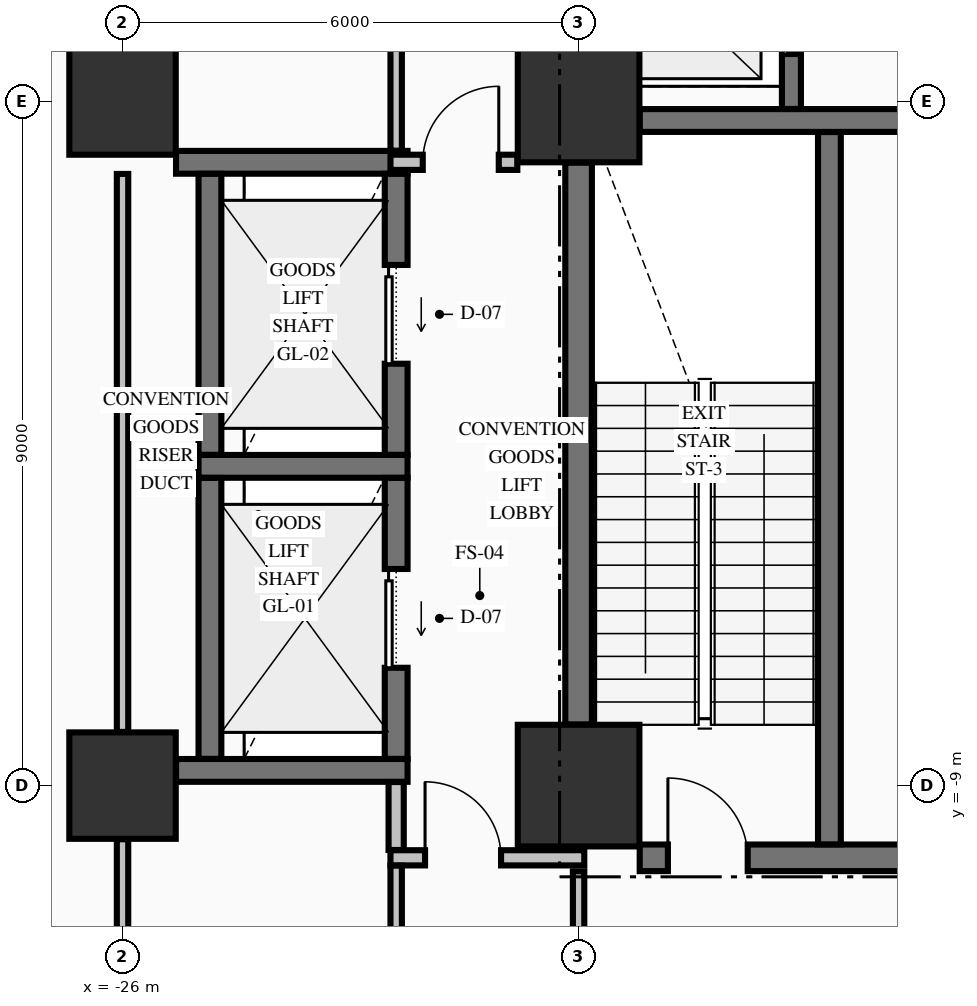
"""IFC4 building model, lengths in metres.
Left out: names, types, materials, properties, quantities, classifications, styles, units other than length and angle.
Written with IfcOpenShell. Run it as: python <this file> out.ifc"""

import sys

from ifc_helpers import new_model, si_unit, direction, frame, frame_2d, origin, origin_2d, place, context, subcontext, project, spatial, rectangle, extrude, element, fill, save


model = new_model("IFC4")
c1 = context("Model", 3, precision=1e-05, world=origin(), true_north=direction((0.0, 1.0)))
c2 = subcontext(c1, "Body", "Model", "MODEL_VIEW")
j1 = project(units=[si_unit("LENGTHUNIT", "METRE"), si_unit("PLANEANGLEUNIT", "RADIAN")], contexts=[c1])
p1 = place(None, origin())
s1 = spatial("IfcSite", under=j1, at=p1, CompositionType="ELEMENT")
p2 = place(p1, origin())
s2 = spatial("IfcBuilding", under=s1, at=p2, CompositionType="ELEMENT")
p3 = place(p2, frame((0.0, 0.0, 5.44)))
s3 = spatial("IfcBuildingStorey", under=s2, at=p3, CompositionType="ELEMENT", Elevation=5.44)
for number, where, z_axis, x_axis in (
    (1, (-26.0, -9.0, 0.0), (0.0, 0.0, 1.0), (1.0, 0.0, 0.0)),
    (2, (-26.0, 0.0, 0.0), (0.0, 0.0, 1.0), (1.0, 0.0, 0.0)),
):
    element("IfcColumn", number, at=place(p3, frame(where, z_axis=z_axis, x_axis=x_axis)), inside=s3, PredefinedType="COLUMN", context=c2, shape_type="SweptSolid", body=[
        extrude(rectangle(XDim=1.4, YDim=1.4, at=origin_2d()), origin(), (0.0, 0.0, 1.0), 5.09),
    ])
for number, where, z_axis, x_axis in (
    (3, (-20.0, -9.0, 0.0), (0.0, 0.0, 1.0), (1.0, 0.0, 0.0)),
    (4, (-20.0, 0.0, 0.0), (0.0, 0.0, 1.0), (1.0, 0.0, 0.0)),
):
    element("IfcColumn", number, at=place(p3, frame(where, z_axis=z_axis, x_axis=x_axis)), inside=s3, PredefinedType="COLUMN", context=c2, shape_type="SweptSolid", body=[
        extrude(rectangle(XDim=1.6, YDim=1.6, at=origin_2d()), origin(), (0.0, 0.0, 1.0), 5.09),
    ])
p4 = place(p3, frame((-19.196, -9.95, 0.0), z_axis=(0.0, 0.0, 1.0), x_axis=(1.0, 0.0, 0.0)))
e5 = element("IfcWall", 5, at=p4, inside=s3, PredefinedType="SHEAR", context=c2, shape_type="SweptSolid", body=[
    extrude(rectangle(XDim=4.496, YDim=0.35, at=frame_2d((2.248, 0.0))), origin(), (0.0, 0.0, 1.0), 5.09),
])
p5 = place(p4, frame((0.371, 0.0, 0.0)))
e6 = element("IfcOpeningElement", 6, at=p5, cuts=e5, PredefinedType="OPENING", context=c2, shape_type="SweptSolid", body=[
    extrude(rectangle(XDim=1.05, YDim=2.15, at=frame_2d((0.525, 1.075))), frame((0.0, 0.185, 0.0), z_axis=(0.0, -1.0, 0.0), x_axis=(1.0, 0.0, 0.0)), (0.0, 0.0, 1.0), 0.37),
])
p6 = place(p3, frame((-25.296, -8.8, 0.0), z_axis=(0.0, 0.0, 1.0), x_axis=(1.0, 0.0, 0.0)))
e7 = element("IfcWall", 7, at=p6, inside=s3, PredefinedType="SHEAR", context=c2, shape_type="SweptSolid", body=[
    extrude(rectangle(XDim=3.046, YDim=0.3, at=frame_2d((1.523, 0.0))), origin(), (0.0, 0.0, 1.0), 5.09),
])
p7 = place(p3, frame((-25.0, -4.8, 0.0), z_axis=(0.0, 0.0, 1.0), x_axis=(1.0, 0.0, 0.0)))
e8 = element("IfcWall", 8, at=p7, inside=s3, PredefinedType="SHEAR", context=c2, shape_type="SweptSolid", body=[
    extrude(rectangle(XDim=2.75, YDim=0.3, at=frame_2d((1.375, 0.0))), origin(), (0.0, 0.0, 1.0), 5.09),
])
p8 = place(p3, frame((-25.296, -0.8, 0.0), z_axis=(0.0, 0.0, 1.0), x_axis=(1.0, 0.0, 0.0)))
e9 = element("IfcWall", 9, at=p8, inside=s3, PredefinedType="SHEAR", context=c2, shape_type="SweptSolid", body=[
    extrude(rectangle(XDim=3.046, YDim=0.3, at=frame_2d((1.523, 0.0))), origin(), (0.0, 0.0, 1.0), 5.09),
])
p9 = place(p3, frame((-19.196, -0.25, 0.0), z_axis=(0.0, 0.0, 1.0), x_axis=(1.0, 0.0, 0.0)))
e10 = element("IfcWall", 10, at=p9, inside=s3, PredefinedType="SHEAR", context=c2, shape_type="SweptSolid", body=[
    extrude(rectangle(XDim=7.392, YDim=0.3, at=frame_2d((3.696, 0.0))), origin(), (0.0, 0.0, 1.0), 5.09),
])
p10 = place(p9, frame((5.496, 0.0, 0.0)))
e11 = element("IfcOpeningElement", 11, at=p10, cuts=e10, PredefinedType="OPENING", context=c2, shape_type="SweptSolid", body=[
    extrude(rectangle(XDim=1.1, YDim=2.15, at=frame_2d((0.55, 1.075))), frame((0.0, 0.16, 0.0), z_axis=(0.0, -1.0, 0.0), x_axis=(1.0, 0.0, 0.0)), (0.0, 0.0, 1.0), 0.32),
])
p11 = place(p3, frame((-22.475, -9.95, 0.0), z_axis=(0.0, 0.0, 1.0), x_axis=(1.0, 0.0, 0.0)))
e12 = element("IfcWall", 12, at=p11, inside=s3, PredefinedType="PARTITIONING", context=c2, shape_type="SweptSolid", body=[
    extrude(rectangle(XDim=2.55, YDim=0.2, at=frame_2d((1.275, 0.0))), origin(), (0.0, 0.0, 1.0), 5.09),
])
p12 = place(p11, frame((0.455, 0.0, 0.0)))
e13 = element("IfcOpeningElement", 13, at=p12, cuts=e12, PredefinedType="OPENING", context=c2, shape_type="SweptSolid", body=[
    extrude(rectangle(XDim=1.0, YDim=2.15, at=frame_2d((0.5, 1.075))), frame((0.0, 0.11, 0.0), z_axis=(0.0, -1.0, 0.0), x_axis=(1.0, 0.0, 0.0)), (0.0, 0.0, 1.0), 0.22),
])
p13 = place(p3, frame((-22.475, -0.8, 0.0), z_axis=(0.0, 0.0, 1.0), x_axis=(1.0, 0.0, 0.0)))
e14 = element("IfcWall", 14, at=p13, inside=s3, PredefinedType="PARTITIONING", context=c2, shape_type="SweptSolid", body=[
    extrude(rectangle(XDim=1.669, YDim=0.2, at=frame_2d((0.834, 0.0))), origin(), (0.0, 0.0, 1.0), 5.09),
])
p14 = place(p13, frame((0.425, 0.0, 0.0)))
e15 = element("IfcOpeningElement", 15, at=p14, cuts=e14, PredefinedType="OPENING", context=c2, shape_type="SweptSolid", body=[
    extrude(rectangle(XDim=1.0, YDim=2.15, at=frame_2d((0.5, 1.075))), frame((0.0, 0.11, 0.0), z_axis=(0.0, -1.0, 0.0), x_axis=(1.0, 0.0, 0.0)), (0.0, 0.0, 1.0), 0.22),
])
for number, where, z_axis, x_axis in (
    (16, (-24.85, -8.648, 0.0), (0.0, 0.0, 1.0), (0.0, 1.0, 0.0)),
    (17, (-24.85, -4.648, 0.0), (0.0, 0.0, 1.0), (0.0, 1.0, 0.0)),
):
    element("IfcWall", number, at=place(p3, frame(where, z_axis=z_axis, x_axis=x_axis)), inside=s3, PredefinedType="SHEAR", context=c2, shape_type="SweptSolid", body=[
        extrude(rectangle(XDim=3.696, YDim=0.3, at=frame_2d((1.848, 0.0))), origin(), (0.0, 0.0, 1.0), 5.09),
    ])
p15 = place(p3, frame((-22.4, -8.648, 0.0), z_axis=(0.0, 0.0, 1.0), x_axis=(0.0, 1.0, 0.0)))
e18 = element("IfcWall", 18, at=p15, inside=s3, PredefinedType="SHEAR", context=c2, shape_type="SweptSolid", body=[
    extrude(rectangle(XDim=3.696, YDim=0.3, at=frame_2d((1.848, 0.0))), origin(), (0.0, 0.0, 1.0), 5.09),
])
p16 = place(p15, frame((1.198, 0.0, 0.0)))
e19 = element("IfcOpeningElement", 19, at=p16, cuts=e18, PredefinedType="OPENING", context=c2, shape_type="SweptSolid", body=[
    extrude(rectangle(XDim=1.3, YDim=2.3, at=frame_2d((0.65, 1.15))), frame((0.0, 0.16, 0.0), z_axis=(0.0, -1.0, 0.0), x_axis=(1.0, 0.0, 0.0)), (0.0, 0.0, 1.0), 0.32),
])
p17 = place(p3, frame((-22.4, -4.648, 0.0), z_axis=(0.0, 0.0, 1.0), x_axis=(0.0, 1.0, 0.0)))
e20 = element("IfcWall", 20, at=p17, inside=s3, PredefinedType="SHEAR", context=c2, shape_type="SweptSolid", body=[
    extrude(rectangle(XDim=3.696, YDim=0.3, at=frame_2d((1.848, 0.0))), origin(), (0.0, 0.0, 1.0), 5.09),
])
p18 = place(p17, frame((1.198, 0.0, 0.0)))
e21 = element("IfcOpeningElement", 21, at=p18, cuts=e20, PredefinedType="OPENING", context=c2, shape_type="SweptSolid", body=[
    extrude(rectangle(XDim=1.3, YDim=2.3, at=frame_2d((0.65, 1.15))), frame((0.0, 0.16, 0.0), z_axis=(0.0, -1.0, 0.0), x_axis=(1.0, 0.0, 0.0)), (0.0, 0.0, 1.0), 0.32),
])
p19 = place(p3, frame((-20.0, -8.196, 0.0), z_axis=(0.0, 0.0, 1.0), x_axis=(0.0, 1.0, 0.0)))
e22 = element("IfcWall", 22, at=p19, inside=s3, PredefinedType="SHEAR", context=c2, shape_type="SweptSolid", body=[
    extrude(rectangle(XDim=7.392, YDim=0.35, at=frame_2d((3.696, 0.0))), origin(), (0.0, 0.0, 1.0), 5.09),
])
p20 = place(p3, frame((-17.2, -0.098, 0.0), z_axis=(0.0, 0.0, 1.0), x_axis=(0.0, 1.0, 0.0)))
e23 = element("IfcWall", 23, at=p20, inside=s3, PredefinedType="SOLIDWALL", context=c2, shape_type="SweptSolid", body=[
    extrude(rectangle(XDim=2.571, YDim=0.25, at=frame_2d((1.285, 0.0))), origin(), (0.0, 0.0, 1.0), 5.09),
])
p21 = place(p20, frame((0.723, 0.0, 0.0)))
e24 = element("IfcOpeningElement", 24, at=p21, cuts=e23, PredefinedType="OPENING", context=c2, shape_type="SweptSolid", body=[
    extrude(rectangle(XDim=1.1, YDim=2.2, at=frame_2d((0.55, 1.1))), frame((0.0, 0.135, 0.0), z_axis=(0.0, -1.0, 0.0), x_axis=(1.0, 0.0, 0.0)), (0.0, 0.0, 1.0), 0.27),
])
p22 = place(p3, frame((-16.7, -9.773, 0.0), z_axis=(0.0, 0.0, 1.0), x_axis=(0.0, 1.0, 0.0)))
e25 = element("IfcWall", 25, at=p22, inside=s3, PredefinedType="SHEAR", context=c2, shape_type="SweptSolid", body=[
    extrude(rectangle(XDim=9.371, YDim=0.3, at=frame_2d((4.686, 0.0))), origin(), (0.0, 0.0, 1.0), 5.09),
])
p23 = place(p3, frame((-26.0, -15.294, 0.0), z_axis=(0.0, 0.0, 1.0), x_axis=(0.0, 1.0, 0.0)))
e26 = element("IfcWall", 26, at=p23, inside=s3, PredefinedType="PARTITIONING", context=c2, shape_type="SweptSolid", body=[
    extrude(rectangle(XDim=5.588, YDim=0.15, at=frame_2d((2.794, 0.0))), origin(), (0.0, 0.0, 1.0), 4.132),
])
p24 = place(p3, frame((-26.0, -8.294, 0.0), z_axis=(0.0, 0.0, 1.0), x_axis=(0.0, 1.0, 0.0)))
e27 = element("IfcWall", 27, at=p24, inside=s3, PredefinedType="PARTITIONING", context=c2, shape_type="SweptSolid", body=[
    extrude(rectangle(XDim=7.341, YDim=0.15, at=frame_2d((3.67, 0.0))), origin(), (0.0, 0.0, 1.0), 4.132),
])
p25 = place(p3, frame((-22.4, -16.122, 0.0), z_axis=(0.0, 0.0, 1.0), x_axis=(0.0, 1.0, 0.0)))
e28 = element("IfcWall", 28, at=p25, inside=s3, PredefinedType="PARTITIONING", context=c2, shape_type="SweptSolid", body=[
    extrude(rectangle(XDim=6.069, YDim=0.15, at=frame_2d((3.035, 0.0))), origin(), (0.0, 0.0, 1.0), 5.09),
])
p26 = place(p3, frame((-22.4, -9.847, 0.0), z_axis=(0.0, 0.0, 1.0), x_axis=(0.0, 1.0, 0.0)))
e29 = element("IfcWall", 29, at=p26, inside=s3, PredefinedType="PARTITIONING", context=c2, shape_type="SweptSolid", body=[
    extrude(rectangle(XDim=0.894, YDim=0.2, at=frame_2d((0.447, 0.0))), origin(), (0.0, 0.0, 1.0), 5.09),
])
p27 = place(p3, frame((-22.4, -0.647, 0.0), z_axis=(0.0, 0.0, 1.0), x_axis=(0.0, 1.0, 0.0)))
e30 = element("IfcWall", 30, at=p27, inside=s3, PredefinedType="PARTITIONING", context=c2, shape_type="SweptSolid", body=[
    extrude(rectangle(XDim=16.569, YDim=0.15, at=frame_2d((8.285, 0.0))), origin(), (0.0, 0.0, 1.0), 5.09),
])
p28 = place(p27, frame((6.597, 0.0, 0.0)))
e31 = element("IfcOpeningElement", 31, at=p28, cuts=e30, PredefinedType="OPENING", context=c2, shape_type="SweptSolid", body=[
    extrude(rectangle(XDim=1.1, YDim=2.15, at=frame_2d((0.55, 1.075))), frame((0.0, 0.085, 0.0), z_axis=(0.0, -1.0, 0.0), x_axis=(1.0, 0.0, 0.0)), (0.0, 0.0, 1.0), 0.17),
])
p29 = place(p3, frame((-20.0, -15.194, 0.0), z_axis=(0.0, 0.0, 1.0), x_axis=(0.0, 1.0, 0.0)))
e32 = element("IfcWall", 32, at=p29, inside=s3, PredefinedType="PARTITIONING", context=c2, shape_type="SweptSolid", body=[
    extrude(rectangle(XDim=5.066, YDim=0.15, at=frame_2d((2.533, 0.0))), origin(), (0.0, 0.0, 1.0), 5.09),
])
p30 = place(p29, frame((1.569, 0.0, 0.0)))
e33 = element("IfcOpeningElement", 33, at=p30, cuts=e32, PredefinedType="OPENING", context=c2, shape_type="SweptSolid", body=[
    extrude(rectangle(XDim=1.05, YDim=2.15, at=frame_2d((0.525, 1.075))), frame((0.0, 0.085, 0.0), z_axis=(0.0, -1.0, 0.0), x_axis=(1.0, 0.0, 0.0)), (0.0, 0.0, 1.0), 0.17),
])
p31 = place(p5, origin())
e34 = element("IfcDoor", 34, at=p31, inside=s3, OperationType="SINGLE_SWING_LEFT", PredefinedType="DOOR", context=c2, shape_type="SweptSolid", body=[
    extrude(rectangle(XDim=1.05, YDim=2.15, at=frame_2d((0.525, 1.075))), frame((0.0, 0.025, 0.0), z_axis=(0.0, -1.0, 0.0), x_axis=(1.0, 0.0, 0.0)), (0.0, 0.0, 1.0), 0.05),
])
fill(e6, e34)
p32 = place(p21, origin())
e35 = element("IfcDoor", 35, at=p32, inside=s3, OperationType="SLIDING_TO_LEFT", PredefinedType="DOOR", context=c2, shape_type="SweptSolid", body=[
    extrude(rectangle(XDim=1.1, YDim=2.2, at=frame_2d((0.55, 1.1))), frame((0.0, 0.025, 0.0), z_axis=(0.0, -1.0, 0.0), x_axis=(1.0, 0.0, 0.0)), (0.0, 0.0, 1.0), 0.05),
])
fill(e24, e35)
p33 = place(p16, origin())
e36 = element("IfcDoor", 36, at=p33, inside=s3, OperationType="SLIDING_TO_LEFT", PredefinedType="DOOR", context=c2, shape_type="SweptSolid", body=[
    extrude(rectangle(XDim=1.3, YDim=2.3, at=frame_2d((0.65, 1.15))), frame((0.0, 0.025, 0.0), z_axis=(0.0, -1.0, 0.0), x_axis=(1.0, 0.0, 0.0)), (0.0, 0.0, 1.0), 0.05),
])
fill(e19, e36)
p34 = place(p18, origin())
e37 = element("IfcDoor", 37, at=p34, inside=s3, OperationType="SLIDING_TO_LEFT", PredefinedType="DOOR", context=c2, shape_type="SweptSolid", body=[
    extrude(rectangle(XDim=1.3, YDim=2.3, at=frame_2d((0.65, 1.15))), frame((0.0, 0.025, 0.0), z_axis=(0.0, -1.0, 0.0), x_axis=(1.0, 0.0, 0.0)), (0.0, 0.0, 1.0), 0.05),
])
fill(e21, e37)
p35 = place(p14, origin())
e38 = element("IfcDoor", 38, at=p35, inside=s3, OperationType="SINGLE_SWING_RIGHT", PredefinedType="DOOR", context=c2, shape_type="SweptSolid", body=[
    extrude(rectangle(XDim=1.0, YDim=2.15, at=frame_2d((0.5, 1.075))), frame((0.0, 0.025, 0.0), z_axis=(0.0, -1.0, 0.0), x_axis=(1.0, 0.0, 0.0)), (0.0, 0.0, 1.0), 0.05),
])
fill(e15, e38)
p36 = place(p12, origin())
e39 = element("IfcDoor", 39, at=p36, inside=s3, OperationType="SINGLE_SWING_LEFT", PredefinedType="DOOR", context=c2, shape_type="SweptSolid", body=[
    extrude(rectangle(XDim=1.0, YDim=2.15, at=frame_2d((0.5, 1.075))), frame((0.0, 0.025, 0.0), z_axis=(0.0, -1.0, 0.0), x_axis=(1.0, 0.0, 0.0)), (0.0, 0.0, 1.0), 0.05),
])
fill(e13, e39)
save(model, sys.argv[1])
